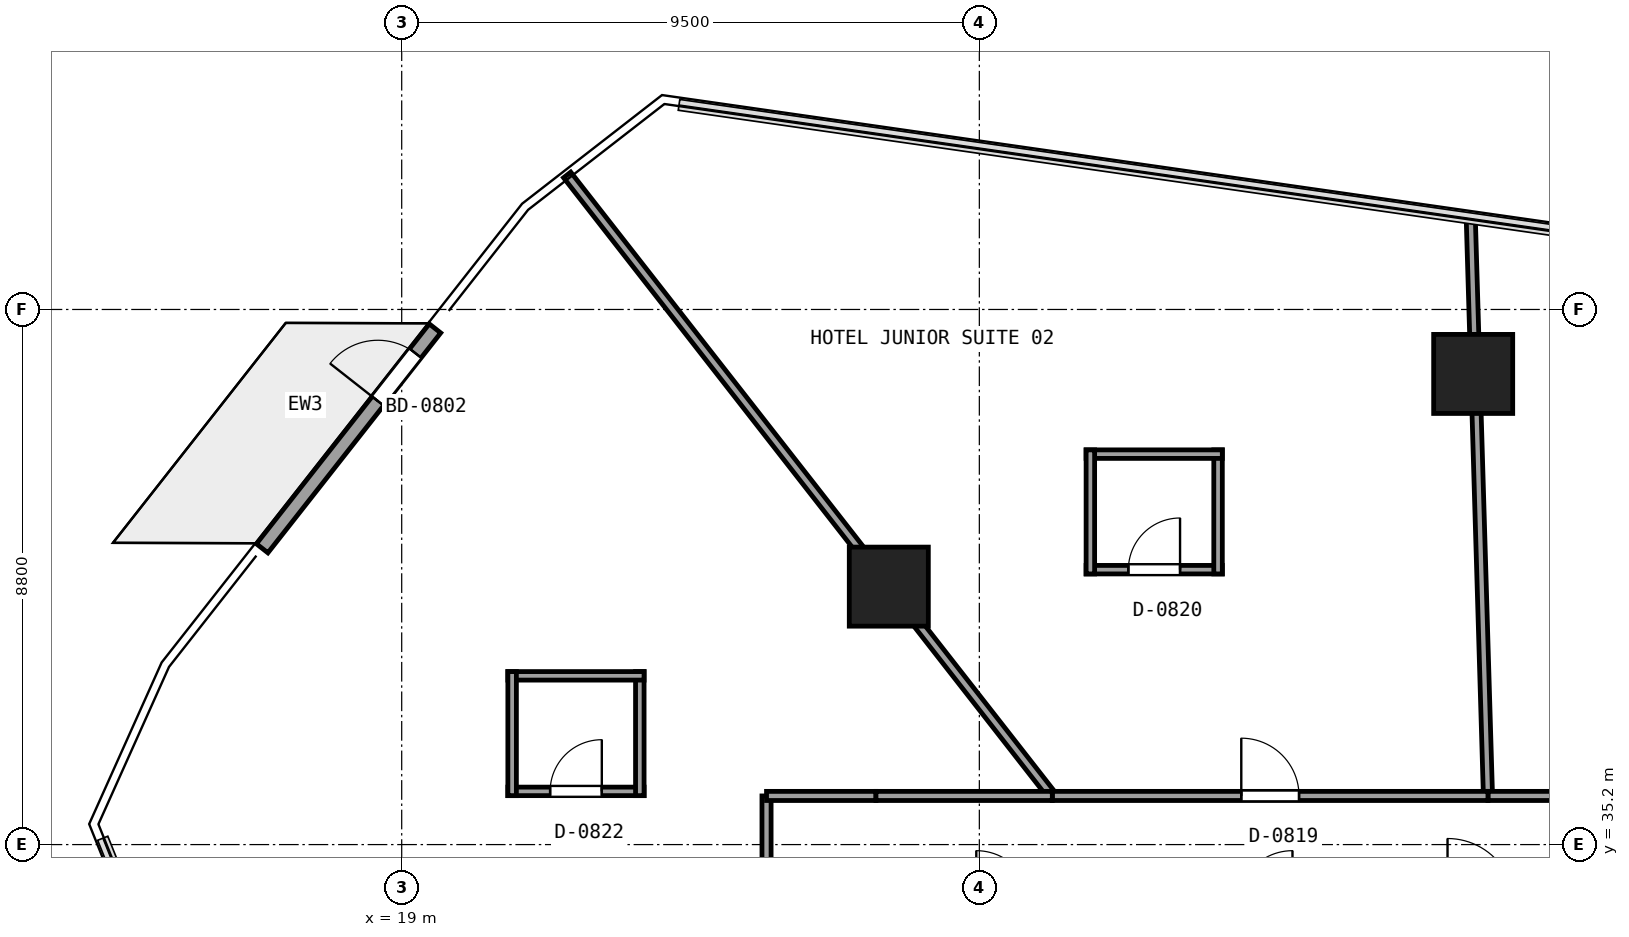
"""IFC4 building model, lengths in metres.
Left out: names, types, materials, properties, quantities, classifications, styles, units other than length and angle.
Written with IfcOpenShell. Run it as: python <this file> out.ifc"""

import sys

from ifc_helpers import new_model, si_unit, direction, frame, frame_2d, origin, origin_2d, place, context, subcontext, project, spatial, rectangle, extrude, element, fill, save


model = new_model("IFC4")
c1 = context("Model", 3, precision=1e-05, world=origin(), true_north=direction((0.0, 1.0)))
c2 = subcontext(c1, "Body", "Model", "MODEL_VIEW")
j1 = project(units=[si_unit("LENGTHUNIT", "METRE"), si_unit("PLANEANGLEUNIT", "RADIAN")], contexts=[c1])
p1 = place(None, origin())
s1 = spatial("IfcSite", under=j1, at=p1, CompositionType="ELEMENT")
p2 = place(p1, origin())
s2 = spatial("IfcBuilding", under=s1, at=p2, CompositionType="ELEMENT")
p3 = place(p2, frame((0.0, 0.0, 37.35)))
s3 = spatial("IfcBuildingStorey", under=s2, at=p3, CompositionType="ELEMENT", Elevation=37.35)
for number, where, z_axis, x_axis in (
    (1, (36.622, 42.94, 0.0), (0.0, 0.0, 1.0), (1.0, 0.0, 0.0)),
    (2, (27.011, 39.442, 0.0), (0.0, 0.0, 1.0), (1.0, 0.0, 0.0)),
):
    element("IfcColumn", number, at=place(p3, frame(where, z_axis=z_axis, x_axis=x_axis)), inside=s3, PredefinedType="COLUMN", context=c2, shape_type="SweptSolid", body=[
        extrude(rectangle(XDim=1.3, YDim=1.3, at=origin_2d()), origin(), (0.0, 0.0, 1.0), 3.17),
    ])
p4 = place(p3, frame((16.705, 40.072, 0.0), z_axis=(0.0, 0.0, 1.0), x_axis=(0.617842647649, 0.786301763158, 0.0)))
e3 = element("IfcWall", 3, at=p4, inside=s3, PredefinedType="SOLIDWALL", context=c2, shape_type="SweptSolid", body=[
    extrude(rectangle(XDim=4.6, YDim=0.24, at=frame_2d((2.3, 0.0))), origin(), (0.0, 0.0, 1.0), 3.17),
])
p5 = place(p4, frame((3.08, 0.0, 0.0)))
e4 = element("IfcOpeningElement", 4, at=p5, cuts=e3, PredefinedType="OPENING", context=c2, shape_type="SweptSolid", body=[
    extrude(rectangle(XDim=1.0, YDim=2.15, at=frame_2d((0.5, 1.075))), frame((0.0, 0.13, 0.0), z_axis=(0.0, -1.0, 0.0), x_axis=(1.0, 0.0, 0.0)), (0.0, 0.0, 1.0), 0.26),
])
p6 = place(p3, frame((30.256, 39.721, 0.0), z_axis=(0.0, 0.0, 1.0), x_axis=(1.0, 0.0, 0.0)))
e5 = element("IfcWall", 5, at=p6, inside=s3, PredefinedType="PARTITIONING", context=c2, shape_type="SweptSolid", body=[
    extrude(rectangle(XDim=2.24, YDim=0.14, at=frame_2d((1.12, 0.0))), origin(), (0.0, 0.0, 1.0), 2.747),
])
p7 = place(p6, frame((0.695, 0.0, 0.0)))
e6 = element("IfcOpeningElement", 6, at=p7, cuts=e5, PredefinedType="OPENING", context=c2, shape_type="SweptSolid", body=[
    extrude(rectangle(XDim=0.85, YDim=2.1, at=frame_2d((0.425, 1.05))), frame((0.0, 0.08, 0.0), z_axis=(0.0, -1.0, 0.0), x_axis=(1.0, 0.0, 0.0)), (0.0, 0.0, 1.0), 0.16),
])
p8 = place(p3, frame((32.426, 39.651, 0.0), z_axis=(0.0, 0.0, 1.0), x_axis=(0.0, 1.0, 0.0)))
e7 = element("IfcWall", 7, at=p8, inside=s3, PredefinedType="PARTITIONING", context=c2, shape_type="SweptSolid", body=[
    extrude(rectangle(XDim=2.04, YDim=0.14, at=frame_2d((1.02, 0.0))), origin(), (0.0, 0.0, 1.0), 2.355),
])
p9 = place(p3, frame((32.496, 41.621, 0.0), z_axis=(0.0, 0.0, 1.0), x_axis=(-1.0, 0.0, 0.0)))
e8 = element("IfcWall", 8, at=p9, inside=s3, PredefinedType="PARTITIONING", context=c2, shape_type="SweptSolid", body=[
    extrude(rectangle(XDim=2.24, YDim=0.14, at=frame_2d((1.12, 0.0))), origin(), (0.0, 0.0, 1.0), 2.355),
])
p10 = place(p3, frame((30.326, 41.691, 0.0), z_axis=(0.0, 0.0, 1.0), x_axis=(0.0, -1.0, 0.0)))
e9 = element("IfcWall", 9, at=p10, inside=s3, PredefinedType="PARTITIONING", context=c2, shape_type="SweptSolid", body=[
    extrude(rectangle(XDim=2.04, YDim=0.14, at=frame_2d((1.02, 0.0))), origin(), (0.0, 0.0, 1.0), 2.355),
])
p11 = place(p3, frame((20.746, 36.075, 0.0), z_axis=(0.0, 0.0, 1.0), x_axis=(1.0, 0.0, 0.0)))
e10 = element("IfcWall", 10, at=p11, inside=s3, PredefinedType="PARTITIONING", context=c2, shape_type="SweptSolid", body=[
    extrude(rectangle(XDim=2.24, YDim=0.14, at=frame_2d((1.12, 0.0))), origin(), (0.0, 0.0, 1.0), 3.17),
])
p12 = place(p11, frame((0.695, 0.0, 0.0)))
e11 = element("IfcOpeningElement", 11, at=p12, cuts=e10, PredefinedType="OPENING", context=c2, shape_type="SweptSolid", body=[
    extrude(rectangle(XDim=0.85, YDim=2.1, at=frame_2d((0.425, 1.05))), frame((0.0, 0.08, 0.0), z_axis=(0.0, -1.0, 0.0), x_axis=(1.0, 0.0, 0.0)), (0.0, 0.0, 1.0), 0.16),
])
p13 = place(p3, frame((22.916, 36.005, 0.0), z_axis=(0.0, 0.0, 1.0), x_axis=(0.0, 1.0, 0.0)))
e12 = element("IfcWall", 12, at=p13, inside=s3, PredefinedType="PARTITIONING", context=c2, shape_type="SweptSolid", body=[
    extrude(rectangle(XDim=2.04, YDim=0.14, at=frame_2d((1.02, 0.0))), origin(), (0.0, 0.0, 1.0), 3.17),
])
p14 = place(p3, frame((22.986, 37.975, 0.0), z_axis=(0.0, 0.0, 1.0), x_axis=(-1.0, 0.0, 0.0)))
e13 = element("IfcWall", 13, at=p14, inside=s3, PredefinedType="PARTITIONING", context=c2, shape_type="SweptSolid", body=[
    extrude(rectangle(XDim=2.24, YDim=0.14, at=frame_2d((1.12, 0.0))), origin(), (0.0, 0.0, 1.0), 3.17),
])
p15 = place(p3, frame((20.816, 38.045, 0.0), z_axis=(0.0, 0.0, 1.0), x_axis=(0.0, -1.0, 0.0)))
e14 = element("IfcWall", 14, at=p15, inside=s3, PredefinedType="PARTITIONING", context=c2, shape_type="SweptSolid", body=[
    extrude(rectangle(XDim=2.04, YDim=0.14, at=frame_2d((1.02, 0.0))), origin(), (0.0, 0.0, 1.0), 3.17),
])
p16 = place(p3, frame((36.581, 45.539, 0.0), z_axis=(0.0, 0.0, 1.0), x_axis=(0.029752383797, -0.999557299837, 0.0)))
e15 = element("IfcWall", 15, at=p16, inside=s3, PredefinedType="PARTITIONING", context=c2, shape_type="SweptSolid", body=[
    extrude(rectangle(XDim=9.543, YDim=0.15, at=frame_2d((4.771, 0.0))), origin(), (0.0, 0.0, 1.0), 2.395),
])
p17 = place(p3, frame((36.865, 36.0, 0.0), z_axis=(0.0, 0.0, 1.0), x_axis=(1.0, 0.0, 0.0)))
e16 = element("IfcWall", 16, at=p17, inside=s3, PredefinedType="PARTITIONING", context=c2, shape_type="SweptSolid", body=[
    extrude(rectangle(XDim=7.31, YDim=0.15, at=frame_2d((3.655, 0.0))), origin(), (0.0, 0.0, 1.0), 2.395),
])
p18 = place(p17, frame((3.18, 0.0, 0.0)))
e17 = element("IfcOpeningElement", 17, at=p18, cuts=e16, PredefinedType="OPENING", context=c2, shape_type="SweptSolid", body=[
    extrude(rectangle(XDim=0.95, YDim=2.15, at=frame_2d((0.475, 1.075))), frame((0.0, 0.085, 0.0), z_axis=(0.0, -1.0, 0.0), x_axis=(1.0, 0.0, 0.0)), (0.0, 0.0, 1.0), 0.17),
])
p19 = place(p3, frame((21.721, 46.213, 0.0), z_axis=(0.0, 0.0, 1.0), x_axis=(0.615652815332, -0.788017519459, 0.0)))
e18 = element("IfcWall", 18, at=p19, inside=s3, PredefinedType="PARTITIONING", context=c2, shape_type="SweptSolid", body=[
    extrude(rectangle(XDim=12.96, YDim=0.15, at=frame_2d((6.48, 0.0))), origin(), (0.0, 0.0, 1.0), 2.395),
])
p20 = place(p3, frame((29.7, 36.0, 0.0), z_axis=(0.0, 0.0, 1.0), x_axis=(1.0, 0.0, 0.0)))
e19 = element("IfcWall", 19, at=p20, inside=s3, PredefinedType="PARTITIONING", context=c2, shape_type="SweptSolid", body=[
    extrude(rectangle(XDim=7.165, YDim=0.15, at=frame_2d((3.583, 0.0))), origin(), (0.0, 0.0, 1.0), 2.395),
])
p21 = place(p20, frame((3.108, 0.0, 0.0)))
e20 = element("IfcOpeningElement", 20, at=p21, cuts=e19, PredefinedType="OPENING", context=c2, shape_type="SweptSolid", body=[
    extrude(rectangle(XDim=0.95, YDim=2.15, at=frame_2d((0.475, 1.075))), frame((0.0, 0.085, 0.0), z_axis=(0.0, -1.0, 0.0), x_axis=(1.0, 0.0, 0.0)), (0.0, 0.0, 1.0), 0.17),
])
p22 = place(p3, frame((25.0, 27.682, 0.0), z_axis=(0.0, 0.0, 1.0), x_axis=(0.0, 1.0, 0.0)))
e21 = element("IfcWall", 21, at=p22, inside=s3, PredefinedType="PARTITIONING", context=c2, shape_type="SweptSolid", body=[
    extrude(rectangle(XDim=8.318, YDim=0.15, at=frame_2d((4.159, 0.0))), origin(), (0.0, 0.0, 1.0), 2.355),
])
p23 = place(p22, frame((3.684, 0.0, 0.0)))
e22 = element("IfcOpeningElement", 22, at=p23, cuts=e21, PredefinedType="OPENING", context=c2, shape_type="SweptSolid", body=[
    extrude(rectangle(XDim=0.95, YDim=2.15, at=frame_2d((0.475, 1.075))), frame((0.0, 0.085, 0.0), z_axis=(0.0, -1.0, 0.0), x_axis=(1.0, 0.0, 0.0)), (0.0, 0.0, 1.0), 0.17),
])
p24 = place(p3, frame((25.0, 36.0, 0.0), z_axis=(0.0, 0.0, 1.0), x_axis=(1.0, 0.0, 0.0)))
e23 = element("IfcWall", 23, at=p24, inside=s3, PredefinedType="PARTITIONING", context=c2, shape_type="SweptSolid", body=[
    extrude(rectangle(XDim=1.8, YDim=0.15, at=frame_2d((0.9, 0.0))), origin(), (0.0, 0.0, 1.0), 2.355),
])
p25 = place(p3, frame((26.8, 36.0, 0.0), z_axis=(0.0, 0.0, 1.0), x_axis=(1.0, 0.0, 0.0)))
e24 = element("IfcWall", 24, at=p25, inside=s3, PredefinedType="PARTITIONING", context=c2, shape_type="SweptSolid", body=[
    extrude(rectangle(XDim=2.9, YDim=0.15, at=frame_2d((1.45, 0.0))), origin(), (0.0, 0.0, 1.0), 2.395),
])
p26 = place(p5, origin())
e25 = element("IfcDoor", 25, at=p26, inside=s3, OperationType="SINGLE_SWING_LEFT", PredefinedType="DOOR", context=c2, shape_type="SweptSolid", body=[
    extrude(rectangle(XDim=1.0, YDim=2.15, at=frame_2d((0.5, 1.075))), frame((0.0, 0.025, 0.0), z_axis=(0.0, -1.0, 0.0), x_axis=(1.0, 0.0, 0.0)), (0.0, 0.0, 1.0), 0.05),
])
fill(e4, e25)
p27 = place(p21, origin())
e26 = element("IfcDoor", 26, at=p27, inside=s3, OperationType="SINGLE_SWING_LEFT", PredefinedType="DOOR", context=c2, shape_type="SweptSolid", body=[
    extrude(rectangle(XDim=0.95, YDim=2.15, at=frame_2d((0.475, 1.075))), frame((0.0, 0.025, 0.0), z_axis=(0.0, -1.0, 0.0), x_axis=(1.0, 0.0, 0.0)), (0.0, 0.0, 1.0), 0.05),
])
fill(e20, e26)
p28 = place(p7, origin())
e27 = element("IfcDoor", 27, at=p28, inside=s3, OperationType="SINGLE_SWING_RIGHT", PredefinedType="DOOR", context=c2, shape_type="SweptSolid", body=[
    extrude(rectangle(XDim=0.85, YDim=2.1, at=frame_2d((0.425, 1.05))), frame((0.0, 0.025, 0.0), z_axis=(0.0, -1.0, 0.0), x_axis=(1.0, 0.0, 0.0)), (0.0, 0.0, 1.0), 0.05),
])
fill(e6, e27)
p29 = place(p12, origin())
e28 = element("IfcDoor", 28, at=p29, inside=s3, OperationType="SINGLE_SWING_RIGHT", PredefinedType="DOOR", context=c2, shape_type="SweptSolid", body=[
    extrude(rectangle(XDim=0.85, YDim=2.1, at=frame_2d((0.425, 1.05))), frame((0.0, 0.025, 0.0), z_axis=(0.0, -1.0, 0.0), x_axis=(1.0, 0.0, 0.0)), (0.0, 0.0, 1.0), 0.05),
])
fill(e11, e28)
save(model, sys.argv[1])
